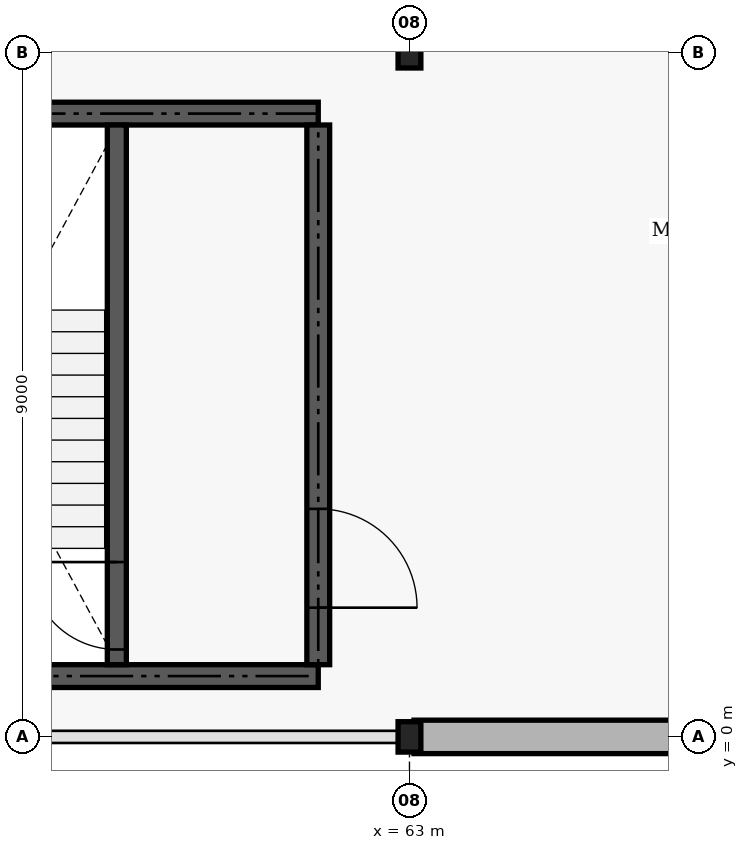
"""IFC4 building model, lengths in metres.
Left out: names, types, materials, properties, quantities, classifications, styles, units other than length and angle.
Written with IfcOpenShell. Run it as: python <this file> out.ifc"""

import sys

from ifc_helpers import new_model, si_unit, direction, frame, frame_2d, origin, origin_2d, place, context, subcontext, project, spatial, rectangle, i_section, extrude, element, fill, save


model = new_model("IFC4")
c1 = context("Model", 3, precision=1e-05, world=origin(), true_north=direction((0.0, 1.0)))
c2 = subcontext(c1, "Body", "Model", "MODEL_VIEW")
j1 = project(units=[si_unit("LENGTHUNIT", "METRE"), si_unit("PLANEANGLEUNIT", "RADIAN")], contexts=[c1])
p1 = place(None, origin())
s1 = spatial("IfcSite", under=j1, at=p1, CompositionType="ELEMENT")
p2 = place(p1, origin())
s2 = spatial("IfcBuilding", under=s1, at=p2, CompositionType="ELEMENT")
p3 = place(p2, frame((0.0, 0.0, 5.4)))
s3 = spatial("IfcBuildingStorey", under=s2, at=p3, CompositionType="ELEMENT", Elevation=5.4)
for number, where, z_axis, x_axis in (
    (1, (63.0, 0.0, 0.0), (0.0, 0.0, 1.0), (1.0, 0.0, 0.0)),
    (2, (63.0, 9.0, 0.0), (0.0, 0.0, 1.0), (1.0, 0.0, 0.0)),
):
    element("IfcColumn", number, at=place(p3, frame(where, z_axis=z_axis, x_axis=x_axis)), inside=s3, PredefinedType="COLUMN", context=c2, shape_type="SweptSolid", body=[
        extrude(i_section(OverallWidth=0.3, OverallDepth=0.4, WebThickness=0.013, FlangeThickness=0.024, FilletRadius=0.027, at=origin_2d()), origin(), (0.0, 0.0, 1.0), 4.2),
    ])
p4 = place(p3, frame((63.06, 0.0, 0.0), z_axis=(0.0, 0.0, 1.0), x_axis=(1.0, 0.0, 0.0)))
e3 = element("IfcWall", 3, at=p4, inside=s3, PredefinedType="SOLIDWALL", context=c2, shape_type="SweptSolid", body=[
    extrude(rectangle(XDim=8.88, YDim=0.44, at=frame_2d((4.44, 0.0))), origin(), (0.0, 0.0, 1.0), 3.5),
])
for number, where, z_axis, x_axis in (
    (4, (55.2, 0.8, 0.0), (0.0, 0.0, 1.0), (1.0, 0.0, 0.0)),
    (5, (55.2, 8.2, 0.0), (0.0, 0.0, 1.0), (1.0, 0.0, 0.0)),
):
    element("IfcWall", number, at=place(p3, frame(where, z_axis=z_axis, x_axis=x_axis)), inside=s3, PredefinedType="SHEAR", context=c2, shape_type="SweptSolid", body=[
        extrude(rectangle(XDim=6.6, YDim=0.3, at=frame_2d((3.3, 0.0))), origin(), (0.0, 0.0, 1.0), 4.2),
    ])
p5 = place(p3, frame((61.8, 0.95, 0.0), z_axis=(0.0, 0.0, 1.0), x_axis=(0.0, 1.0, 0.0)))
e6 = element("IfcWall", 6, at=p5, inside=s3, PredefinedType="SHEAR", context=c2, shape_type="SweptSolid", body=[
    extrude(rectangle(XDim=7.1, YDim=0.3, at=frame_2d((3.55, 0.0))), origin(), (0.0, 0.0, 1.0), 4.2),
])
p6 = place(p5, frame((0.75, 0.0, 0.0)))
e7 = element("IfcOpeningElement", 7, at=p6, cuts=e6, PredefinedType="OPENING", context=c2, shape_type="SweptSolid", body=[
    extrude(rectangle(XDim=1.3, YDim=2.15, at=frame_2d((0.65, 1.075))), frame((0.0, 0.16, 0.0), z_axis=(0.0, -1.0, 0.0), x_axis=(1.0, 0.0, 0.0)), (0.0, 0.0, 1.0), 0.32),
])
p7 = place(p3, frame((59.15, 0.95, 0.0), z_axis=(0.0, 0.0, 1.0), x_axis=(0.0, 1.0, 0.0)))
e8 = element("IfcWall", 8, at=p7, inside=s3, PredefinedType="SHEAR", context=c2, shape_type="SweptSolid", body=[
    extrude(rectangle(XDim=7.1, YDim=0.25, at=frame_2d((3.55, 0.0))), origin(), (0.0, 0.0, 1.0), 4.2),
])
p8 = place(p7, frame((0.2, 0.0, 0.0)))
e9 = element("IfcOpeningElement", 9, at=p8, cuts=e8, PredefinedType="OPENING", context=c2, shape_type="SweptSolid", body=[
    extrude(rectangle(XDim=1.15, YDim=2.15, at=frame_2d((0.575, 1.075))), frame((0.0, 0.135, 0.0), z_axis=(0.0, -1.0, 0.0), x_axis=(1.0, 0.0, 0.0)), (0.0, 0.0, 1.0), 0.27),
])
p9 = place(p6, frame((1.3, 0.0, 0.0), z_axis=(0.0, 0.0, 1.0), x_axis=(-1.0, 0.0, 0.0)))
e10 = element("IfcDoor", 10, at=p9, inside=s3, OperationType="DOUBLE_DOOR_SINGLE_SWING", PredefinedType="DOOR", context=c2, shape_type="SweptSolid", body=[
    extrude(rectangle(XDim=1.3, YDim=2.15, at=frame_2d((0.65, 1.075))), frame((0.0, 0.025, 0.0), z_axis=(0.0, -1.0, 0.0), x_axis=(1.0, 0.0, 0.0)), (0.0, 0.0, 1.0), 0.05),
])
fill(e7, e10)
p10 = place(p8, frame((1.15, 0.0, 0.0), z_axis=(0.0, 0.0, 1.0), x_axis=(-1.0, 0.0, 0.0)))
e11 = element("IfcDoor", 11, at=p10, inside=s3, OperationType="SINGLE_SWING_RIGHT", PredefinedType="DOOR", context=c2, shape_type="SweptSolid", body=[
    extrude(rectangle(XDim=1.15, YDim=2.15, at=frame_2d((0.575, 1.075))), frame((0.0, 0.025, 0.0), z_axis=(0.0, -1.0, 0.0), x_axis=(1.0, 0.0, 0.0)), (0.0, 0.0, 1.0), 0.05),
])
fill(e9, e11)
save(model, sys.argv[1])
